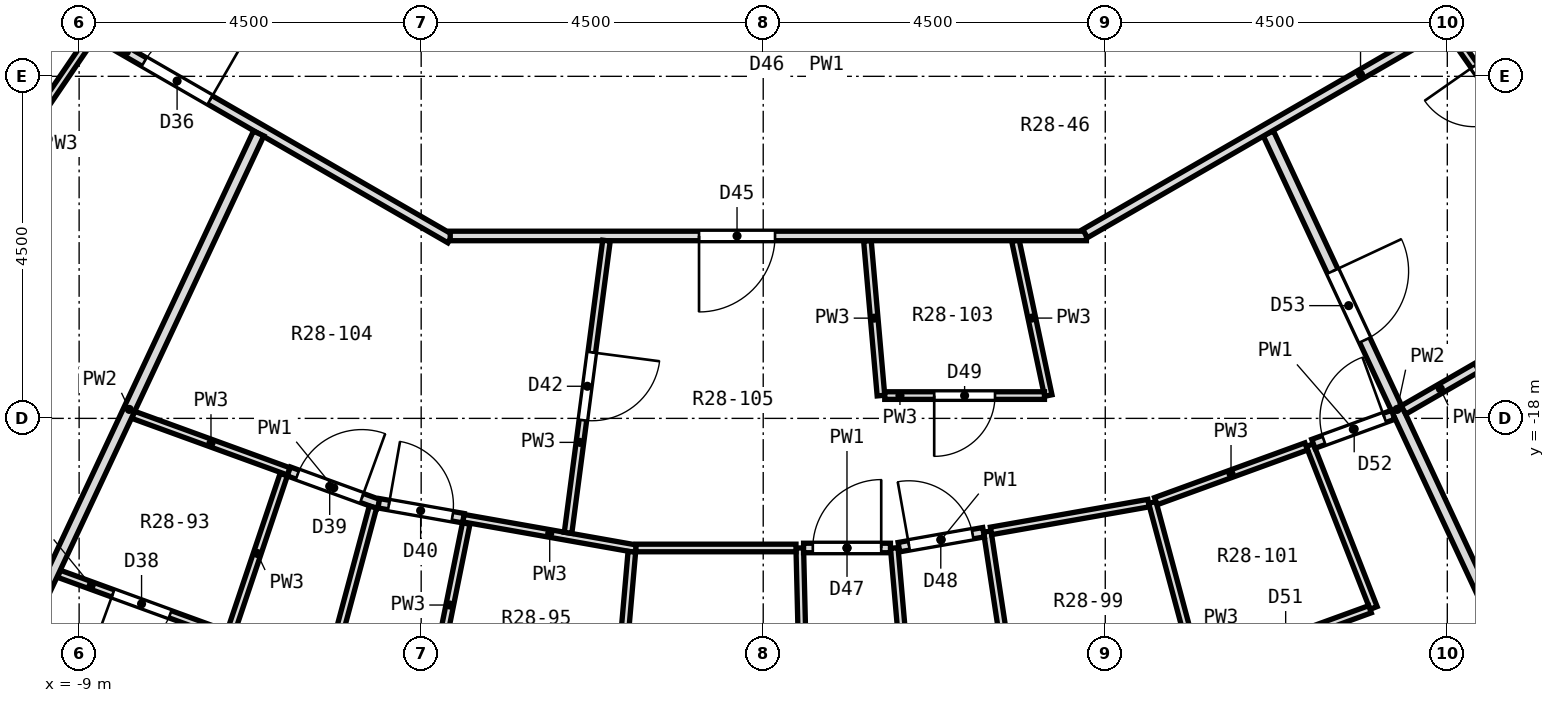
"""IFC4 building model, lengths in metres.
Left out: names, types, materials, properties, quantities, classifications, styles, units other than length and angle.
Written with IfcOpenShell. Run it as: python <this file> out.ifc"""

import sys

from ifc_helpers import new_model, si_unit, direction, frame, frame_2d, origin, place, context, subcontext, project, spatial, rectangle, extrude, element, fill, save


model = new_model("IFC4")
c1 = context("Model", 3, precision=1e-05, world=origin(), true_north=direction((0.0, 1.0)))
c2 = subcontext(c1, "Body", "Model", "MODEL_VIEW")
j1 = project(units=[si_unit("LENGTHUNIT", "METRE"), si_unit("PLANEANGLEUNIT", "RADIAN")], contexts=[c1])
p1 = place(None, origin())
s1 = spatial("IfcSite", under=j1, at=p1, CompositionType="ELEMENT")
p2 = place(p1, origin())
s2 = spatial("IfcBuilding", under=s1, at=p2, CompositionType="ELEMENT")
p3 = place(p2, frame((0.0, 0.0, 190.5)))
s3 = spatial("IfcBuildingStorey", under=s2, at=p3, CompositionType="ELEMENT", Elevation=190.5)
p4 = place(p3, frame((0.481, -19.705, 0.0), z_axis=(0.0, 0.0, 1.0), x_axis=(0.024408861322, -0.99970205936, 0.0)))
e1 = element("IfcWall", 1, at=p4, inside=s3, PredefinedType="PARTITIONING", context=c2, shape_type="SweptSolid", body=[
    extrude(rectangle(XDim=2.301, YDim=0.1, at=frame_2d((1.15, 0.0))), origin(), (0.0, 0.0, 1.0), 2.85),
])
p5 = place(p3, frame((1.371, -15.662, 0.0), z_axis=(0.0, 0.0, 1.0), x_axis=(0.087124015283, -0.996197473376, 0.0)))
e2 = element("IfcWall", 2, at=p5, inside=s3, PredefinedType="PARTITIONING", context=c2, shape_type="SweptSolid", body=[
    extrude(rectangle(XDim=2.046, YDim=0.1, at=frame_2d((1.023, 0.0))), origin(), (0.0, 0.0, 1.0), 2.85),
])
p6 = place(p3, frame((1.724, -19.705, 0.0), z_axis=(0.0, 0.0, 1.0), x_axis=(0.087060633562, -0.996203014492, 0.0)))
e3 = element("IfcWall", 3, at=p6, inside=s3, PredefinedType="PARTITIONING", context=c2, shape_type="SweptSolid", body=[
    extrude(rectangle(XDim=3.96, YDim=0.1, at=frame_2d((1.98, 0.0))), origin(), (0.0, 0.0, 1.0), 2.85),
])
p7 = place(p3, frame((2.948, -19.489, 0.0), z_axis=(0.0, 0.0, 1.0), x_axis=(0.149927962289, -0.98869692329, 0.0)))
e4 = element("IfcWall", 4, at=p7, inside=s3, PredefinedType="PARTITIONING", context=c2, shape_type="SweptSolid", body=[
    extrude(rectangle(XDim=2.301, YDim=0.1, at=frame_2d((1.15, 0.0))), origin(), (0.0, 0.0, 1.0), 2.85),
])
p8 = place(p3, frame((3.318, -15.661, 0.0), z_axis=(0.0, 0.0, 1.0), x_axis=(0.207344548251, -0.978267978782, 0.0)))
e5 = element("IfcWall", 5, at=p8, inside=s3, PredefinedType="PARTITIONING", context=c2, shape_type="SweptSolid", body=[
    extrude(rectangle(XDim=2.084, YDim=0.1, at=frame_2d((1.042, 0.0))), origin(), (0.0, 0.0, 1.0), 2.85),
])
p9 = place(p3, frame((5.119, -19.106, 0.0), z_axis=(0.0, 0.0, 1.0), x_axis=(0.259051417791, -0.965863532255, 0.0)))
e6 = element("IfcWall", 6, at=p9, inside=s3, PredefinedType="PARTITIONING", context=c2, shape_type="SweptSolid", body=[
    extrude(rectangle(XDim=3.96, YDim=0.1, at=frame_2d((1.98, 0.0))), origin(), (0.0, 0.0, 1.0), 2.85),
])
p10 = place(p3, frame((7.191, -18.352, 0.0), z_axis=(0.0, 0.0, 1.0), x_axis=(0.364775478286, -0.931095510912, 0.0)))
e7 = element("IfcWall", 7, at=p10, inside=s3, PredefinedType="PARTITIONING", context=c2, shape_type="SweptSolid", body=[
    extrude(rectangle(XDim=2.3, YDim=0.1, at=frame_2d((1.15, 0.0))), origin(), (0.0, 0.0, 1.0), 2.85),
])
p11 = place(p3, frame((6.645, -14.249, 0.0), z_axis=(0.0, 0.0, 1.0), x_axis=(0.422700425591, -0.90626946887, 0.0)))
e8 = element("IfcWall", 8, at=p11, inside=s3, PredefinedType="PARTITIONING", context=c2, shape_type="SweptSolid", body=[
    extrude(rectangle(XDim=8.018, YDim=0.15, at=frame_2d((4.009, 0.0))), origin(), (0.0, 0.0, 1.0), 2.85),
])
p12 = place(p11, frame((2.002, 0.0, 0.0)))
e9 = element("IfcOpeningElement", 9, at=p12, cuts=e8, PredefinedType="OPENING", context=c2, shape_type="SweptSolid", body=[
    extrude(rectangle(XDim=1.0, YDim=2.1, at=frame_2d((0.5, 1.05))), frame((0.0, 0.087, 0.0), z_axis=(0.0, -1.0, 0.0), x_axis=(1.0, 0.0, 0.0)), (0.0, 0.0, 1.0), 0.174),
])
p13 = place(p3, frame((9.019, -12.88, 0.0), z_axis=(0.0, 0.0, 1.0), x_axis=(0.573550536535, -0.819170178925, 0.0)))
e10 = element("IfcWall", 10, at=p13, inside=s3, PredefinedType="PARTITIONING", context=c2, shape_type="SweptSolid", body=[
    extrude(rectangle(XDim=2.044, YDim=0.1, at=frame_2d((1.022, 0.0))), origin(), (0.0, 0.0, 1.0), 2.85),
])
p14 = place(p13, frame((0.59, 0.0, 0.0)))
e11 = element("IfcOpeningElement", 11, at=p14, cuts=e10, PredefinedType="OPENING", context=c2, shape_type="SweptSolid", body=[
    extrude(rectangle(XDim=0.8, YDim=2.1, at=frame_2d((0.4, 1.05))), frame((0.0, 0.062, 0.0), z_axis=(0.0, -1.0, 0.0), x_axis=(1.0, 0.0, 0.0)), (0.0, 0.0, 1.0), 0.124),
])
p15 = place(p3, frame((-11.366, -11.451, 0.0), z_axis=(0.0, 0.0, 1.0), x_axis=(0.866032091518, -0.499988416326, 0.0)))
e12 = element("IfcWall", 12, at=p15, inside=s3, PredefinedType="PARTITIONING", context=c2, shape_type="SweptSolid", body=[
    extrude(rectangle(XDim=8.37, YDim=0.125, at=frame_2d((4.185, 0.0))), origin(), (0.0, 0.0, 1.0), 2.85),
])
p16 = place(p15, frame((0.998, 0.0, 0.0)))
e13 = element("IfcOpeningElement", 13, at=p16, cuts=e12, PredefinedType="OPENING", context=c2, shape_type="SweptSolid", body=[
    extrude(rectangle(XDim=0.9, YDim=2.1, at=frame_2d((0.45, 1.05))), frame((0.0, 0.074, 0.0), z_axis=(0.0, -1.0, 0.0), x_axis=(1.0, 0.0, 0.0)), (0.0, 0.0, 1.0), 0.149),
])
p17 = place(p15, frame((3.72, 0.0, 0.0)))
e14 = element("IfcOpeningElement", 14, at=p17, cuts=e12, PredefinedType="OPENING", context=c2, shape_type="SweptSolid", body=[
    extrude(rectangle(XDim=1.0, YDim=2.1, at=frame_2d((0.5, 1.05))), frame((0.0, 0.074, 0.0), z_axis=(0.0, -1.0, 0.0), x_axis=(1.0, 0.0, 0.0)), (0.0, 0.0, 1.0), 0.149),
])
p18 = place(p3, frame((-9.264, -20.045, 0.0), z_axis=(0.0, 0.0, 1.0), x_axis=(0.939661926998, -0.342104462045, 0.0)))
e15 = element("IfcWall", 15, at=p18, inside=s3, PredefinedType="PARTITIONING", context=c2, shape_type="SweptSolid", body=[
    extrude(rectangle(XDim=2.386, YDim=0.1, at=frame_2d((1.193, 0.0))), origin(), (0.0, 0.0, 1.0), 2.85),
])
p19 = place(p18, frame((0.756, 0.0, 0.0)))
e16 = element("IfcOpeningElement", 16, at=p19, cuts=e15, PredefinedType="OPENING", context=c2, shape_type="SweptSolid", body=[
    extrude(rectangle(XDim=0.8, YDim=2.1, at=frame_2d((0.4, 1.05))), frame((0.0, 0.062, 0.0), z_axis=(0.0, -1.0, 0.0), x_axis=(1.0, 0.0, 0.0)), (0.0, 0.0, 1.0), 0.124),
])
p20 = place(p3, frame((-8.289, -17.953, 0.0), z_axis=(0.0, 0.0, 1.0), x_axis=(0.939678877388, -0.34205790064, 0.0)))
e17 = element("IfcWall", 17, at=p20, inside=s3, PredefinedType="PARTITIONING", context=c2, shape_type="SweptSolid", body=[
    extrude(rectangle(XDim=2.179, YDim=0.1, at=frame_2d((1.089, 0.0))), origin(), (0.0, 0.0, 1.0), 2.85),
])
p21 = place(p3, frame((-6.241, -18.698, 0.0), z_axis=(0.0, 0.0, 1.0), x_axis=(0.939793423488, -0.341743063087, 0.0)))
e18 = element("IfcWall", 18, at=p21, inside=s3, PredefinedType="PARTITIONING", context=c2, shape_type="SweptSolid", body=[
    extrude(rectangle(XDim=1.257, YDim=0.125, at=frame_2d((0.629, 0.0))), origin(), (0.0, 0.0, 1.0), 2.85),
])
p22 = place(p21, frame((0.122, 0.0, 0.0)))
e19 = element("IfcOpeningElement", 19, at=p22, cuts=e18, PredefinedType="OPENING", context=c2, shape_type="SweptSolid", body=[
    extrude(rectangle(XDim=0.9, YDim=2.1, at=frame_2d((0.45, 1.05))), frame((0.0, 0.074, 0.0), z_axis=(0.0, -1.0, 0.0), x_axis=(1.0, 0.0, 0.0)), (0.0, 0.0, 1.0), 0.149),
])
p23 = place(p3, frame((-3.944, -19.313, 0.0), z_axis=(0.0, 0.0, 1.0), x_axis=(0.984635015371, -0.174624988207, 0.0)))
e20 = element("IfcWall", 20, at=p23, inside=s3, PredefinedType="PARTITIONING", context=c2, shape_type="SweptSolid", body=[
    extrude(rectangle(XDim=2.305, YDim=0.1, at=frame_2d((1.153, 0.0))), origin(), (0.0, 0.0, 1.0), 2.85),
])
p24 = place(p3, frame((-5.057, -19.117, 0.0), z_axis=(0.0, 0.0, 1.0), x_axis=(0.984803124218, -0.17367442682, 0.0)))
e21 = element("IfcWall", 21, at=p24, inside=s3, PredefinedType="PARTITIONING", context=c2, shape_type="SweptSolid", body=[
    extrude(rectangle(XDim=1.13, YDim=0.125, at=frame_2d((0.565, 0.0))), origin(), (0.0, 0.0, 1.0), 2.85),
])
p25 = place(p24, frame((0.134, 0.0, 0.0)))
e22 = element("IfcOpeningElement", 22, at=p25, cuts=e21, PredefinedType="OPENING", context=c2, shape_type="SweptSolid", body=[
    extrude(rectangle(XDim=0.85, YDim=2.1, at=frame_2d((0.425, 1.05))), frame((0.0, 0.074, 0.0), z_axis=(0.0, -1.0, 0.0), x_axis=(1.0, 0.0, 0.0)), (0.0, 0.0, 1.0), 0.149),
])
p26 = place(p3, frame((-1.674, -19.705, 0.0), z_axis=(0.0, 0.0, 1.0), x_axis=(1.0, 0.0, 0.0)))
e23 = element("IfcWall", 23, at=p26, inside=s3, PredefinedType="PARTITIONING", context=c2, shape_type="SweptSolid", body=[
    extrude(rectangle(XDim=2.105, YDim=0.1, at=frame_2d((1.052, 0.0))), origin(), (0.0, 0.0, 1.0), 2.85),
])
p27 = place(p3, frame((0.531, -19.705, 0.0), z_axis=(0.0, 0.0, 1.0), x_axis=(1.0, 0.0, 0.0)))
e24 = element("IfcWall", 24, at=p27, inside=s3, PredefinedType="PARTITIONING", context=c2, shape_type="SweptSolid", body=[
    extrude(rectangle(XDim=1.143, YDim=0.125, at=frame_2d((0.572, 0.0))), origin(), (0.0, 0.0, 1.0), 2.85),
])
p28 = place(p27, frame((0.122, 0.0, 0.0)))
e25 = element("IfcOpeningElement", 25, at=p28, cuts=e24, PredefinedType="OPENING", context=c2, shape_type="SweptSolid", body=[
    extrude(rectangle(XDim=0.9, YDim=2.1, at=frame_2d((0.45, 1.05))), frame((0.0, 0.074, 0.0), z_axis=(0.0, -1.0, 0.0), x_axis=(1.0, 0.0, 0.0)), (0.0, 0.0, 1.0), 0.149),
])
p29 = place(p3, frame((1.599, -17.7, 0.0), z_axis=(0.0, 0.0, 1.0), x_axis=(1.0, 0.0, 0.0)))
e26 = element("IfcWall", 26, at=p29, inside=s3, PredefinedType="PARTITIONING", context=c2, shape_type="SweptSolid", body=[
    extrude(rectangle(XDim=2.101, YDim=0.1, at=frame_2d((1.05, 0.0))), origin(), (0.0, 0.0, 1.0), 2.85),
])
p30 = place(p29, frame((0.65, 0.0, 0.0)))
e27 = element("IfcOpeningElement", 27, at=p30, cuts=e26, PredefinedType="OPENING", context=c2, shape_type="SweptSolid", body=[
    extrude(rectangle(XDim=0.8, YDim=2.1, at=frame_2d((0.4, 1.05))), frame((0.0, 0.062, 0.0), z_axis=(0.0, -1.0, 0.0), x_axis=(1.0, 0.0, 0.0)), (0.0, 0.0, 1.0), 0.124),
])
p31 = place(p3, frame((-4.117, -15.6, 0.0), z_axis=(0.0, 0.0, 1.0), x_axis=(1.0, 0.0, 0.0)))
e28 = element("IfcWall", 28, at=p31, inside=s3, PredefinedType="PARTITIONING", context=c2, shape_type="SweptSolid", body=[
    extrude(rectangle(XDim=8.37, YDim=0.125, at=frame_2d((4.185, 0.0))), origin(), (0.0, 0.0, 1.0), 2.85),
])
p32 = place(p31, frame((3.273, 0.0, 0.0)))
e29 = element("IfcOpeningElement", 29, at=p32, cuts=e28, PredefinedType="OPENING", context=c2, shape_type="SweptSolid", body=[
    extrude(rectangle(XDim=1.0, YDim=2.1, at=frame_2d((0.5, 1.05))), frame((0.0, 0.074, 0.0), z_axis=(0.0, -1.0, 0.0), x_axis=(1.0, 0.0, 0.0)), (0.0, 0.0, 1.0), 0.149),
])
p33 = place(p3, frame((2.997, -19.48, 0.0), z_axis=(0.0, 0.0, 1.0), x_axis=(0.984804573467, 0.173666208797, 0.0)))
e30 = element("IfcWall", 30, at=p33, inside=s3, PredefinedType="PARTITIONING", context=c2, shape_type="SweptSolid", body=[
    extrude(rectangle(XDim=2.104, YDim=0.1, at=frame_2d((1.052, 0.0))), origin(), (0.0, 0.0, 1.0), 2.85),
])
p34 = place(p3, frame((1.786, -19.694, 0.0), z_axis=(0.0, 0.0, 1.0), x_axis=(0.984803124218, 0.17367442682, 0.0)))
e31 = element("IfcWall", 31, at=p34, inside=s3, PredefinedType="PARTITIONING", context=c2, shape_type="SweptSolid", body=[
    extrude(rectangle(XDim=1.13, YDim=0.125, at=frame_2d((0.565, 0.0))), origin(), (0.0, 0.0, 1.0), 2.85),
])
p35 = place(p34, frame((0.134, 0.0, 0.0)))
e32 = element("IfcOpeningElement", 32, at=p35, cuts=e31, PredefinedType="OPENING", context=c2, shape_type="SweptSolid", body=[
    extrude(rectangle(XDim=0.85, YDim=2.1, at=frame_2d((0.425, 1.05))), frame((0.0, 0.074, 0.0), z_axis=(0.0, -1.0, 0.0), x_axis=(1.0, 0.0, 0.0)), (0.0, 0.0, 1.0), 0.149),
])
p36 = place(p3, frame((5.764, -21.319, 0.0), z_axis=(0.0, 0.0, 1.0), x_axis=(0.939663558851, 0.342099979782, 0.0)))
e33 = element("IfcWall", 33, at=p36, inside=s3, PredefinedType="PARTITIONING", context=c2, shape_type="SweptSolid", body=[
    extrude(rectangle(XDim=2.362, YDim=0.1, at=frame_2d((1.181, 0.0))), origin(), (0.0, 0.0, 1.0), 2.85),
])
p37 = place(p36, frame((0.781, 0.0, 0.0)))
e34 = element("IfcOpeningElement", 34, at=p37, cuts=e33, PredefinedType="OPENING", context=c2, shape_type="SweptSolid", body=[
    extrude(rectangle(XDim=0.8, YDim=2.1, at=frame_2d((0.4, 1.05))), frame((0.0, 0.062, 0.0), z_axis=(0.0, -1.0, 0.0), x_axis=(1.0, 0.0, 0.0)), (0.0, 0.0, 1.0), 0.124),
])
p38 = place(p3, frame((5.166, -19.089, 0.0), z_axis=(0.0, 0.0, 1.0), x_axis=(0.939725675468, 0.341929312674, 0.0)))
e35 = element("IfcWall", 35, at=p38, inside=s3, PredefinedType="PARTITIONING", context=c2, shape_type="SweptSolid", body=[
    extrude(rectangle(XDim=2.105, YDim=0.1, at=frame_2d((1.052, 0.0))), origin(), (0.0, 0.0, 1.0), 2.85),
])
p39 = place(p3, frame((7.238, -18.335, 0.0), z_axis=(0.0, 0.0, 1.0), x_axis=(0.939704125186, 0.341988533591, 0.0)))
e36 = element("IfcWall", 36, at=p39, inside=s3, PredefinedType="PARTITIONING", context=c2, shape_type="SweptSolid", body=[
    extrude(rectangle(XDim=1.118, YDim=0.125, at=frame_2d((0.559, 0.0))), origin(), (0.0, 0.0, 1.0), 2.85),
])
p40 = place(p39, frame((0.146, 0.0, 0.0)))
e37 = element("IfcOpeningElement", 37, at=p40, cuts=e36, PredefinedType="OPENING", context=c2, shape_type="SweptSolid", body=[
    extrude(rectangle(XDim=0.85, YDim=2.1, at=frame_2d((0.425, 1.05))), frame((0.0, 0.074, 0.0), z_axis=(0.0, -1.0, 0.0), x_axis=(1.0, 0.0, 0.0)), (0.0, 0.0, 1.0), 0.149),
])
p41 = place(p3, frame((8.424, -17.889, 0.0), z_axis=(0.0, 0.0, 1.0), x_axis=(0.86607294768, 0.499917642513, 0.0)))
e38 = element("IfcWall", 38, at=p41, inside=s3, PredefinedType="PARTITIONING", context=c2, shape_type="SweptSolid", body=[
    extrude(rectangle(XDim=1.119, YDim=0.125, at=frame_2d((0.56, 0.0))), origin(), (0.0, 0.0, 1.0), 2.85),
])
p42 = place(p3, frame((4.234, -15.569, 0.0), z_axis=(0.0, 0.0, 1.0), x_axis=(0.866024799292, 0.50000104701, 0.0)))
e39 = element("IfcWall", 39, at=p42, inside=s3, PredefinedType="PARTITIONING", context=c2, shape_type="SweptSolid", body=[
    extrude(rectangle(XDim=8.37, YDim=0.125, at=frame_2d((4.185, 0.0))), origin(), (0.0, 0.0, 1.0), 2.85),
])
p43 = place(p3, frame((-10.754, -15.794, 0.0), z_axis=(0.0, 0.0, 1.0), x_axis=(0.562822277652, 0.826577935695, 0.0)))
e40 = element("IfcWall", 40, at=p43, inside=s3, PredefinedType="PARTITIONING", context=c2, shape_type="SweptSolid", body=[
    extrude(rectangle(XDim=3.402, YDim=0.1, at=frame_2d((1.701, 0.0))), origin(), (0.0, 0.0, 1.0), 2.85),
])
p44 = place(p3, frame((-10.041, -21.512, 0.0), z_axis=(0.0, 0.0, 1.0), x_axis=(0.424428415396, 0.905461495705, 0.0)))
e41 = element("IfcWall", 41, at=p44, inside=s3, PredefinedType="PARTITIONING", context=c2, shape_type="SweptSolid", body=[
    extrude(rectangle(XDim=8.018, YDim=0.15, at=frame_2d((4.009, 0.0))), origin(), (0.0, 0.0, 1.0), 2.85),
])
p45 = place(p3, frame((-7.006, -20.814, 0.0), z_axis=(0.0, 0.0, 1.0), x_axis=(0.319138695408, 0.947708021014, 0.0)))
e42 = element("IfcWall", 42, at=p45, inside=s3, PredefinedType="PARTITIONING", context=c2, shape_type="SweptSolid", body=[
    extrude(rectangle(XDim=2.188, YDim=0.1, at=frame_2d((1.094, 0.0))), origin(), (0.0, 0.0, 1.0), 2.85),
])
p46 = place(p3, frame((-6.145, -22.931, 0.0), z_axis=(0.0, 0.0, 1.0), x_axis=(0.259139967725, 0.965839778186, 0.0)))
e43 = element("IfcWall", 43, at=p46, inside=s3, PredefinedType="PARTITIONING", context=c2, shape_type="SweptSolid", body=[
    extrude(rectangle(XDim=3.897, YDim=0.1, at=frame_2d((1.949, 0.0))), origin(), (0.0, 0.0, 1.0), 2.85),
])
p47 = place(p3, frame((-4.34, -21.528, 0.0), z_axis=(0.0, 0.0, 1.0), x_axis=(0.197725242549, 0.980257480695, 0.0)))
e44 = element("IfcWall", 44, at=p47, inside=s3, PredefinedType="PARTITIONING", context=c2, shape_type="SweptSolid", body=[
    extrude(rectangle(XDim=2.188, YDim=0.1, at=frame_2d((1.094, 0.0))), origin(), (0.0, 0.0, 1.0), 2.85),
])
p48 = place(p3, frame((-2.567, -19.505, 0.0), z_axis=(0.0, 0.0, 1.0), x_axis=(0.130303001962, 0.991474219372, 0.0)))
e45 = element("IfcWall", 45, at=p48, inside=s3, PredefinedType="PARTITIONING", context=c2, shape_type="SweptSolid", body=[
    extrude(rectangle(XDim=3.876, YDim=0.1, at=frame_2d((1.938, 0.0))), origin(), (0.0, 0.0, 1.0), 2.85),
])
p49 = place(p48, frame((1.494, 0.0, 0.0)))
e46 = element("IfcOpeningElement", 46, at=p49, cuts=e45, PredefinedType="OPENING", context=c2, shape_type="SweptSolid", body=[
    extrude(rectangle(XDim=0.9, YDim=2.1, at=frame_2d((0.45, 1.05))), frame((0.0, 0.062, 0.0), z_axis=(0.0, -1.0, 0.0), x_axis=(1.0, 0.0, 0.0)), (0.0, 0.0, 1.0), 0.124),
])
p50 = place(p3, frame((-2.069, -23.65, 0.0), z_axis=(0.0, 0.0, 1.0), x_axis=(0.087111950553, 0.996198528442, 0.0)))
e47 = element("IfcWall", 47, at=p50, inside=s3, PredefinedType="PARTITIONING", context=c2, shape_type="SweptSolid", body=[
    extrude(rectangle(XDim=3.91, YDim=0.1, at=frame_2d((1.955, 0.0))), origin(), (0.0, 0.0, 1.0), 2.85),
])
p51 = place(p17, origin())
e48 = element("IfcDoor", 48, at=p51, inside=s3, OperationType="SINGLE_SWING_RIGHT", PredefinedType="DOOR", context=c2, shape_type="SweptSolid", body=[
    extrude(rectangle(XDim=1.0, YDim=2.1, at=frame_2d((0.5, 1.05))), frame((0.0, 0.025, 0.0), z_axis=(0.0, -1.0, 0.0), x_axis=(1.0, 0.0, 0.0)), (0.0, 0.0, 1.0), 0.05),
])
fill(e14, e48)
p52 = place(p19, frame((0.8, 0.0, 0.0), z_axis=(0.0, 0.0, 1.0), x_axis=(-1.0, 0.0, 0.0)))
e49 = element("IfcDoor", 49, at=p52, inside=s3, OperationType="SINGLE_SWING_RIGHT", PredefinedType="DOOR", context=c2, shape_type="SweptSolid", body=[
    extrude(rectangle(XDim=0.8, YDim=2.1, at=frame_2d((0.4, 1.05))), frame((0.0, 0.025, 0.0), z_axis=(0.0, -1.0, 0.0), x_axis=(1.0, 0.0, 0.0)), (0.0, 0.0, 1.0), 0.05),
])
fill(e16, e49)
p53 = place(p22, origin())
e50 = element("IfcDoor", 50, at=p53, inside=s3, OperationType="SINGLE_SWING_RIGHT", PredefinedType="DOOR", context=c2, shape_type="SweptSolid", body=[
    extrude(rectangle(XDim=0.9, YDim=2.1, at=frame_2d((0.45, 1.05))), frame((0.0, 0.025, 0.0), z_axis=(0.0, -1.0, 0.0), x_axis=(1.0, 0.0, 0.0)), (0.0, 0.0, 1.0), 0.05),
])
fill(e19, e50)
p54 = place(p25, origin())
e51 = element("IfcDoor", 51, at=p54, inside=s3, OperationType="SINGLE_SWING_LEFT", PredefinedType="DOOR", context=c2, shape_type="SweptSolid", body=[
    extrude(rectangle(XDim=0.85, YDim=2.1, at=frame_2d((0.425, 1.05))), frame((0.0, 0.025, 0.0), z_axis=(0.0, -1.0, 0.0), x_axis=(1.0, 0.0, 0.0)), (0.0, 0.0, 1.0), 0.05),
])
fill(e22, e51)
p55 = place(p49, frame((0.9, 0.0, 0.0), z_axis=(0.0, 0.0, 1.0), x_axis=(-1.0, 0.0, 0.0)))
e52 = element("IfcDoor", 52, at=p55, inside=s3, OperationType="SINGLE_SWING_LEFT", PredefinedType="DOOR", context=c2, shape_type="SweptSolid", body=[
    extrude(rectangle(XDim=0.9, YDim=2.1, at=frame_2d((0.45, 1.05))), frame((0.0, 0.025, 0.0), z_axis=(0.0, -1.0, 0.0), x_axis=(1.0, 0.0, 0.0)), (0.0, 0.0, 1.0), 0.05),
])
fill(e46, e52)
p56 = place(p32, frame((1.0, 0.0, 0.0), z_axis=(0.0, 0.0, 1.0), x_axis=(-1.0, 0.0, 0.0)))
e53 = element("IfcDoor", 53, at=p56, inside=s3, OperationType="SINGLE_SWING_RIGHT", PredefinedType="DOOR", context=c2, shape_type="SweptSolid", body=[
    extrude(rectangle(XDim=1.0, YDim=2.1, at=frame_2d((0.5, 1.05))), frame((0.0, 0.025, 0.0), z_axis=(0.0, -1.0, 0.0), x_axis=(1.0, 0.0, 0.0)), (0.0, 0.0, 1.0), 0.05),
])
fill(e29, e53)
p57 = place(p28, origin())
e54 = element("IfcDoor", 54, at=p57, inside=s3, OperationType="SINGLE_SWING_RIGHT", PredefinedType="DOOR", context=c2, shape_type="SweptSolid", body=[
    extrude(rectangle(XDim=0.9, YDim=2.1, at=frame_2d((0.45, 1.05))), frame((0.0, 0.025, 0.0), z_axis=(0.0, -1.0, 0.0), x_axis=(1.0, 0.0, 0.0)), (0.0, 0.0, 1.0), 0.05),
])
fill(e25, e54)
p58 = place(p35, origin())
e55 = element("IfcDoor", 55, at=p58, inside=s3, OperationType="SINGLE_SWING_LEFT", PredefinedType="DOOR", context=c2, shape_type="SweptSolid", body=[
    extrude(rectangle(XDim=0.85, YDim=2.1, at=frame_2d((0.425, 1.05))), frame((0.0, 0.025, 0.0), z_axis=(0.0, -1.0, 0.0), x_axis=(1.0, 0.0, 0.0)), (0.0, 0.0, 1.0), 0.05),
])
fill(e32, e55)
p59 = place(p30, frame((0.8, 0.0, 0.0), z_axis=(0.0, 0.0, 1.0), x_axis=(-1.0, 0.0, 0.0)))
e56 = element("IfcDoor", 56, at=p59, inside=s3, OperationType="SINGLE_SWING_RIGHT", PredefinedType="DOOR", context=c2, shape_type="SweptSolid", body=[
    extrude(rectangle(XDim=0.8, YDim=2.1, at=frame_2d((0.4, 1.05))), frame((0.0, 0.025, 0.0), z_axis=(0.0, -1.0, 0.0), x_axis=(1.0, 0.0, 0.0)), (0.0, 0.0, 1.0), 0.05),
])
fill(e27, e56)
p60 = place(p40, origin())
e57 = element("IfcDoor", 57, at=p60, inside=s3, OperationType="SINGLE_SWING_RIGHT", PredefinedType="DOOR", context=c2, shape_type="SweptSolid", body=[
    extrude(rectangle(XDim=0.85, YDim=2.1, at=frame_2d((0.425, 1.05))), frame((0.0, 0.025, 0.0), z_axis=(0.0, -1.0, 0.0), x_axis=(1.0, 0.0, 0.0)), (0.0, 0.0, 1.0), 0.05),
])
fill(e37, e57)
p61 = place(p12, origin())
e58 = element("IfcDoor", 58, at=p61, inside=s3, OperationType="SINGLE_SWING_LEFT", PredefinedType="DOOR", context=c2, shape_type="SweptSolid", body=[
    extrude(rectangle(XDim=1.0, YDim=2.1, at=frame_2d((0.5, 1.05))), frame((0.0, 0.025, 0.0), z_axis=(0.0, -1.0, 0.0), x_axis=(1.0, 0.0, 0.0)), (0.0, 0.0, 1.0), 0.05),
])
fill(e9, e58)
p62 = place(p14, frame((0.8, 0.0, 0.0), z_axis=(0.0, 0.0, 1.0), x_axis=(-1.0, 0.0, 0.0)))
e59 = element("IfcDoor", 59, at=p62, inside=s3, OperationType="SINGLE_SWING_RIGHT", PredefinedType="DOOR", context=c2, shape_type="SweptSolid", body=[
    extrude(rectangle(XDim=0.8, YDim=2.1, at=frame_2d((0.4, 1.05))), frame((0.0, 0.025, 0.0), z_axis=(0.0, -1.0, 0.0), x_axis=(1.0, 0.0, 0.0)), (0.0, 0.0, 1.0), 0.05),
])
fill(e11, e59)
save(model, sys.argv[1])
